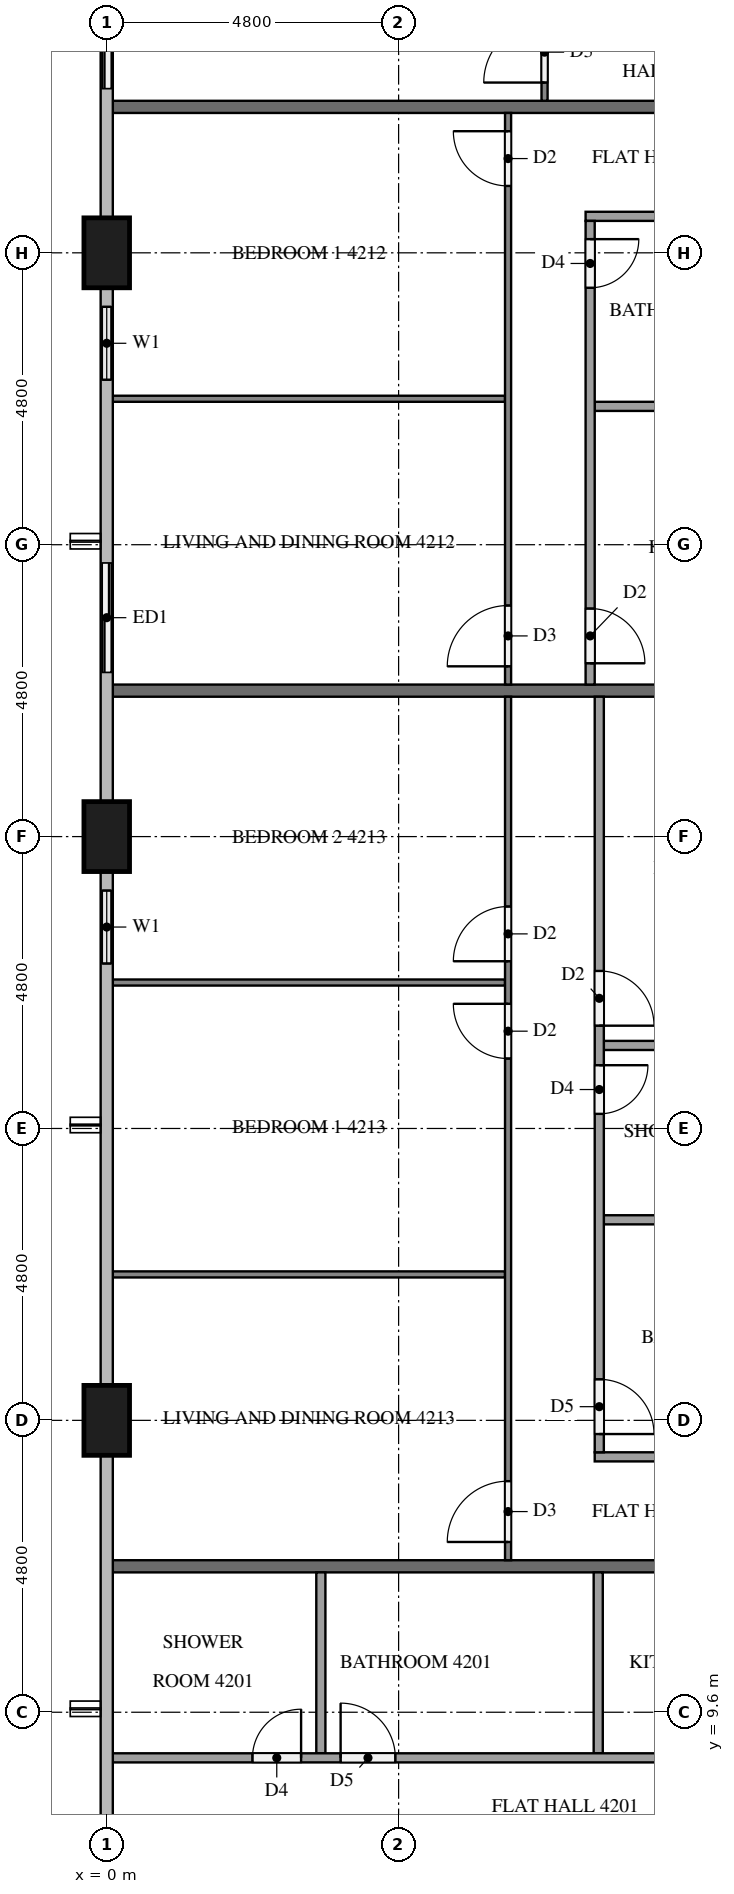
"""IFC4 building model, lengths in metres.
Left out: names, types, materials, properties, quantities, classifications, styles, units other than length and angle.
Written with IfcOpenShell. Run it as: python <this file> out.ifc"""

import sys

from ifc_helpers import new_model, si_unit, direction, frame, frame_2d, origin, origin_2d, place, context, subcontext, project, spatial, rectangle, extrude, element, fill, save


model = new_model("IFC4")
c1 = context("Model", 3, precision=1e-05, world=origin(), true_north=direction((0.0, 1.0)))
c2 = subcontext(c1, "Body", "Model", "MODEL_VIEW")
j1 = project(units=[si_unit("LENGTHUNIT", "METRE"), si_unit("PLANEANGLEUNIT", "RADIAN")], contexts=[c1])
p1 = place(None, origin())
s1 = spatial("IfcSite", under=j1, at=p1, CompositionType="ELEMENT")
p2 = place(p1, origin())
s2 = spatial("IfcBuilding", under=s1, at=p2, CompositionType="ELEMENT")
p3 = place(p2, frame((0.0, 0.0, 163.0)))
s3 = spatial("IfcBuildingStorey", under=s2, at=p3, CompositionType="ELEMENT", Elevation=163.0)
for number, where, z_axis, x_axis in (
    (1, (0.0, 33.6, 0.0), (0.0, 0.0, 1.0), (0.0, 1.0, 0.0)),
    (2, (0.0, 24.0, 0.0), (0.0, 0.0, 1.0), (0.0, 1.0, 0.0)),
    (3, (0.0, 14.4, 0.0), (0.0, 0.0, 1.0), (0.0, 1.0, 0.0)),
):
    element("IfcColumn", number, at=place(p3, frame(where, z_axis=z_axis, x_axis=x_axis)), inside=s3, PredefinedType="COLUMN", context=c2, shape_type="SweptSolid", body=[
        extrude(rectangle(XDim=1.15, YDim=0.75, at=origin_2d()), origin(), (0.0, 0.0, 1.0), 3.2),
    ])
p4 = place(p3, frame((0.0, 38.4, 0.0), z_axis=(0.0, 0.0, 1.0), x_axis=(0.0, -1.0, 0.0)))
e4 = element("IfcWall", 4, at=p4, inside=s3, PredefinedType="SOLIDWALL", context=c2, shape_type="SweptSolid", body=[
    extrude(rectangle(XDim=2.4, YDim=0.15, at=frame_2d((1.2, 0.0))), origin(), (0.0, 0.0, 1.0), 3.2),
])
p5 = place(p4, frame((0.3, 0.0, 0.0)))
e5 = element("IfcOpeningElement", 5, at=p5, cuts=e4, PredefinedType="OPENING", context=c2, shape_type="SweptSolid", body=[
    extrude(rectangle(XDim=1.8, YDim=2.4, at=frame_2d((0.9, 1.2))), frame((0.0, 0.085, 0.0), z_axis=(0.0, -1.0, 0.0), x_axis=(1.0, 0.0, 0.0)), (0.0, 0.0, 1.0), 0.17),
])
p6 = place(p3, frame((0.0, 33.025, 0.0), z_axis=(0.0, 0.0, 1.0), x_axis=(0.0, -1.0, 0.0)))
e6 = element("IfcWall", 6, at=p6, inside=s3, PredefinedType="SOLIDWALL", context=c2, shape_type="SweptSolid", body=[
    extrude(rectangle(XDim=1.825, YDim=0.15, at=frame_2d((0.913, 0.0))), origin(), (0.0, 0.0, 1.0), 3.2),
])
p7 = place(p6, frame((0.312, 0.0, 0.9)))
e7 = element("IfcOpeningElement", 7, at=p7, cuts=e6, PredefinedType="OPENING", context=c2, shape_type="SweptSolid", body=[
    extrude(rectangle(XDim=1.2, YDim=1.4, at=frame_2d((0.6, 0.7))), frame((0.0, 0.085, 0.0), z_axis=(0.0, -1.0, 0.0), x_axis=(1.0, 0.0, 0.0)), (0.0, 0.0, 1.0), 0.17),
])
p8 = place(p3, frame((0.0, 28.8, 0.0), z_axis=(0.0, 0.0, 1.0), x_axis=(0.0, -1.0, 0.0)))
e8 = element("IfcWall", 8, at=p8, inside=s3, PredefinedType="SOLIDWALL", context=c2, shape_type="SweptSolid", body=[
    extrude(rectangle(XDim=2.4, YDim=0.15, at=frame_2d((1.2, 0.0))), origin(), (0.0, 0.0, 1.0), 3.2),
])
p9 = place(p8, frame((0.3, 0.0, 0.0)))
e9 = element("IfcOpeningElement", 9, at=p9, cuts=e8, PredefinedType="OPENING", context=c2, shape_type="SweptSolid", body=[
    extrude(rectangle(XDim=1.8, YDim=2.4, at=frame_2d((0.9, 1.2))), frame((0.0, 0.085, 0.0), z_axis=(0.0, -1.0, 0.0), x_axis=(1.0, 0.0, 0.0)), (0.0, 0.0, 1.0), 0.17),
])
p10 = place(p3, frame((0.0, 23.425, 0.0), z_axis=(0.0, 0.0, 1.0), x_axis=(0.0, -1.0, 0.0)))
e10 = element("IfcWall", 10, at=p10, inside=s3, PredefinedType="SOLIDWALL", context=c2, shape_type="SweptSolid", body=[
    extrude(rectangle(XDim=1.825, YDim=0.15, at=frame_2d((0.913, 0.0))), origin(), (0.0, 0.0, 1.0), 3.2),
])
p11 = place(p10, frame((0.312, 0.0, 0.9)))
e11 = element("IfcOpeningElement", 11, at=p11, cuts=e10, PredefinedType="OPENING", context=c2, shape_type="SweptSolid", body=[
    extrude(rectangle(XDim=1.2, YDim=1.4, at=frame_2d((0.6, 0.7))), frame((0.0, 0.085, 0.0), z_axis=(0.0, -1.0, 0.0), x_axis=(1.0, 0.0, 0.0)), (0.0, 0.0, 1.0), 0.17),
])
for number, where, z_axis, x_axis in (
    (12, (0.1, 12.0, 0.0), (0.0, 0.0, 1.0), (1.0, 0.0, 0.0)),
    (13, (0.1, 36.0, 0.0), (0.0, 0.0, 1.0), (1.0, 0.0, 0.0)),
    (14, (0.1, 26.4, 0.0), (0.0, 0.0, 1.0), (1.0, 0.0, 0.0)),
):
    element("IfcWall", number, at=place(p3, frame(where, z_axis=z_axis, x_axis=x_axis)), inside=s3, PredefinedType="PARTITIONING", context=c2, shape_type="SweptSolid", body=[
        extrude(rectangle(XDim=11.8, YDim=0.2, at=frame_2d((5.9, 0.0))), origin(), (0.0, 0.0, 1.0), 3.2),
    ])
for number, where, z_axis, x_axis in (
    (15, (8.083, 11.9, 0.0), (0.0, 0.0, 1.0), (0.0, -1.0, 0.0)),
    (16, (3.521, 11.9, 0.0), (0.0, 0.0, 1.0), (0.0, -1.0, 0.0)),
):
    element("IfcWall", number, at=place(p3, frame(where, z_axis=z_axis, x_axis=x_axis)), inside=s3, PredefinedType="PARTITIONING", context=c2, shape_type="SweptSolid", body=[
        extrude(rectangle(XDim=2.975, YDim=0.15, at=frame_2d((1.487, 0.0))), origin(), (0.0, 0.0, 1.0), 3.2),
    ])
p12 = place(p3, frame((0.1, 8.85, 0.0), z_axis=(0.0, 0.0, 1.0), x_axis=(1.0, 0.0, 0.0)))
e17 = element("IfcWall", 17, at=p12, inside=s3, PredefinedType="PARTITIONING", context=c2, shape_type="SweptSolid", body=[
    extrude(rectangle(XDim=14.825, YDim=0.15, at=frame_2d((7.413, 0.0))), origin(), (0.0, 0.0, 1.0), 3.2),
])
p13 = place(p12, frame((13.625, 0.0, 0.0)))
e18 = element("IfcOpeningElement", 18, at=p13, cuts=e17, PredefinedType="OPENING", context=c2, shape_type="SweptSolid", body=[
    extrude(rectangle(XDim=0.9, YDim=2.1, at=frame_2d((0.45, 1.05))), frame((0.0, 0.085, 0.0), z_axis=(0.0, -1.0, 0.0), x_axis=(1.0, 0.0, 0.0)), (0.0, 0.0, 1.0), 0.17),
])
p14 = place(p12, frame((3.746, 0.0, 0.0)))
e19 = element("IfcOpeningElement", 19, at=p14, cuts=e17, PredefinedType="OPENING", context=c2, shape_type="SweptSolid", body=[
    extrude(rectangle(XDim=0.9, YDim=2.1, at=frame_2d((0.45, 1.05))), frame((0.0, 0.085, 0.0), z_axis=(0.0, -1.0, 0.0), x_axis=(1.0, 0.0, 0.0)), (0.0, 0.0, 1.0), 0.17),
])
p15 = place(p12, frame((2.296, 0.0, 0.0)))
e20 = element("IfcOpeningElement", 20, at=p15, cuts=e17, PredefinedType="OPENING", context=c2, shape_type="SweptSolid", body=[
    extrude(rectangle(XDim=0.8, YDim=2.1, at=frame_2d((0.4, 1.05))), frame((0.0, 0.085, 0.0), z_axis=(0.0, -1.0, 0.0), x_axis=(1.0, 0.0, 0.0)), (0.0, 0.0, 1.0), 0.17),
])
p16 = place(p3, frame((7.2, 36.1, 0.0), z_axis=(0.0, 0.0, 1.0), x_axis=(0.0, 1.0, 0.0)))
e21 = element("IfcWall", 21, at=p16, inside=s3, PredefinedType="PARTITIONING", context=c2, shape_type="SweptSolid", body=[
    extrude(rectangle(XDim=11.8, YDim=0.1, at=frame_2d((5.9, 0.0))), origin(), (0.0, 0.0, 1.0), 3.2),
])
p17 = place(p16, frame((0.3, 0.0, 0.0)))
e22 = element("IfcOpeningElement", 22, at=p17, cuts=e21, PredefinedType="OPENING", context=c2, shape_type="SweptSolid", body=[
    extrude(rectangle(XDim=1.0, YDim=2.1, at=frame_2d((0.5, 1.05))), frame((0.0, 0.06, 0.0), z_axis=(0.0, -1.0, 0.0), x_axis=(1.0, 0.0, 0.0)), (0.0, 0.0, 1.0), 0.12),
])
p18 = place(p16, frame((10.6, 0.0, 0.0)))
e23 = element("IfcOpeningElement", 23, at=p18, cuts=e21, PredefinedType="OPENING", context=c2, shape_type="SweptSolid", body=[
    extrude(rectangle(XDim=0.9, YDim=2.1, at=frame_2d((0.45, 1.05))), frame((0.0, 0.06, 0.0), z_axis=(0.0, -1.0, 0.0), x_axis=(1.0, 0.0, 0.0)), (0.0, 0.0, 1.0), 0.12),
])
p19 = place(p3, frame((6.55, 31.2, 0.0), z_axis=(0.0, 0.0, 1.0), x_axis=(-1.0, 0.0, 0.0)))
e24 = element("IfcWall", 24, at=p19, inside=s3, PredefinedType="PARTITIONING", context=c2, shape_type="SweptSolid", body=[
    extrude(rectangle(XDim=6.45, YDim=0.1, at=frame_2d((3.225, 0.0))), origin(), (0.0, 0.0, 1.0), 3.2),
])
p20 = place(p3, frame((6.6, 26.5, 0.0), z_axis=(0.0, 0.0, 1.0), x_axis=(0.0, 1.0, 0.0)))
e25 = element("IfcWall", 25, at=p20, inside=s3, PredefinedType="PARTITIONING", context=c2, shape_type="SweptSolid", body=[
    extrude(rectangle(XDim=9.4, YDim=0.1, at=frame_2d((4.7, 0.0))), origin(), (0.0, 0.0, 1.0), 3.2),
])
p21 = place(p20, frame((8.2, 0.0, 0.0)))
e26 = element("IfcOpeningElement", 26, at=p21, cuts=e25, PredefinedType="OPENING", context=c2, shape_type="SweptSolid", body=[
    extrude(rectangle(XDim=0.9, YDim=2.1, at=frame_2d((0.45, 1.05))), frame((0.0, 0.06, 0.0), z_axis=(0.0, -1.0, 0.0), x_axis=(1.0, 0.0, 0.0)), (0.0, 0.0, 1.0), 0.12),
])
p22 = place(p20, frame((0.3, 0.0, 0.0)))
e27 = element("IfcOpeningElement", 27, at=p22, cuts=e25, PredefinedType="OPENING", context=c2, shape_type="SweptSolid", body=[
    extrude(rectangle(XDim=1.0, YDim=2.1, at=frame_2d((0.5, 1.05))), frame((0.0, 0.06, 0.0), z_axis=(0.0, -1.0, 0.0), x_axis=(1.0, 0.0, 0.0)), (0.0, 0.0, 1.0), 0.12),
])
p23 = place(p3, frame((11.9, 31.075, 0.0), z_axis=(0.0, 0.0, 1.0), x_axis=(-1.0, 0.0, 0.0)))
e28 = element("IfcWall", 28, at=p23, inside=s3, PredefinedType="PARTITIONING", context=c2, shape_type="SweptSolid", body=[
    extrude(rectangle(XDim=3.875, YDim=0.15, at=frame_2d((1.938, 0.0))), origin(), (0.0, 0.0, 1.0), 3.2),
])
p24 = place(p3, frame((11.9, 34.2, 0.0), z_axis=(0.0, 0.0, 1.0), x_axis=(-1.0, 0.0, 0.0)))
e29 = element("IfcWall", 29, at=p24, inside=s3, PredefinedType="PARTITIONING", context=c2, shape_type="SweptSolid", body=[
    extrude(rectangle(XDim=4.025, YDim=0.15, at=frame_2d((2.012, 0.0))), origin(), (0.0, 0.0, 1.0), 3.2),
])
p25 = place(p3, frame((7.95, 34.125, 0.0), z_axis=(0.0, 0.0, 1.0), x_axis=(0.0, -1.0, 0.0)))
e30 = element("IfcWall", 30, at=p25, inside=s3, PredefinedType="PARTITIONING", context=c2, shape_type="SweptSolid", body=[
    extrude(rectangle(XDim=7.625, YDim=0.15, at=frame_2d((3.812, 0.0))), origin(), (0.0, 0.0, 1.0), 3.2),
])
p26 = place(p25, frame((0.3, 0.0, 0.0)))
e31 = element("IfcOpeningElement", 31, at=p26, cuts=e30, PredefinedType="OPENING", context=c2, shape_type="SweptSolid", body=[
    extrude(rectangle(XDim=0.8, YDim=2.1, at=frame_2d((0.4, 1.05))), frame((0.0, 0.085, 0.0), z_axis=(0.0, -1.0, 0.0), x_axis=(1.0, 0.0, 0.0)), (0.0, 0.0, 1.0), 0.17),
])
p27 = place(p25, frame((6.375, 0.0, 0.0)))
e32 = element("IfcOpeningElement", 32, at=p27, cuts=e30, PredefinedType="OPENING", context=c2, shape_type="SweptSolid", body=[
    extrude(rectangle(XDim=0.9, YDim=2.1, at=frame_2d((0.45, 1.05))), frame((0.0, 0.085, 0.0), z_axis=(0.0, -1.0, 0.0), x_axis=(1.0, 0.0, 0.0)), (0.0, 0.0, 1.0), 0.17),
])
for number, where, z_axis, x_axis in (
    (33, (6.55, 16.8, 0.0), (0.0, 0.0, 1.0), (-1.0, 0.0, 0.0)),
    (34, (6.55, 21.6, 0.0), (0.0, 0.0, 1.0), (-1.0, 0.0, 0.0)),
):
    element("IfcWall", number, at=place(p3, frame(where, z_axis=z_axis, x_axis=x_axis)), inside=s3, PredefinedType="PARTITIONING", context=c2, shape_type="SweptSolid", body=[
        extrude(rectangle(XDim=6.45, YDim=0.1, at=frame_2d((3.225, 0.0))), origin(), (0.0, 0.0, 1.0), 3.2),
    ])
p28 = place(p3, frame((6.6, 12.1, 0.0), z_axis=(0.0, 0.0, 1.0), x_axis=(0.0, 1.0, 0.0)))
e35 = element("IfcWall", 35, at=p28, inside=s3, PredefinedType="PARTITIONING", context=c2, shape_type="SweptSolid", body=[
    extrude(rectangle(XDim=14.2, YDim=0.1, at=frame_2d((7.1, 0.0))), origin(), (0.0, 0.0, 1.0), 3.2),
])
p29 = place(p28, frame((0.3, 0.0, 0.0)))
e36 = element("IfcOpeningElement", 36, at=p29, cuts=e35, PredefinedType="OPENING", context=c2, shape_type="SweptSolid", body=[
    extrude(rectangle(XDim=1.0, YDim=2.1, at=frame_2d((0.5, 1.05))), frame((0.0, 0.06, 0.0), z_axis=(0.0, -1.0, 0.0), x_axis=(1.0, 0.0, 0.0)), (0.0, 0.0, 1.0), 0.12),
])
p30 = place(p28, frame((8.25, 0.0, 0.0)))
e37 = element("IfcOpeningElement", 37, at=p30, cuts=e35, PredefinedType="OPENING", context=c2, shape_type="SweptSolid", body=[
    extrude(rectangle(XDim=0.9, YDim=2.1, at=frame_2d((0.45, 1.05))), frame((0.0, 0.06, 0.0), z_axis=(0.0, -1.0, 0.0), x_axis=(1.0, 0.0, 0.0)), (0.0, 0.0, 1.0), 0.12),
])
p31 = place(p28, frame((9.85, 0.0, 0.0)))
e38 = element("IfcOpeningElement", 38, at=p31, cuts=e35, PredefinedType="OPENING", context=c2, shape_type="SweptSolid", body=[
    extrude(rectangle(XDim=0.9, YDim=2.1, at=frame_2d((0.45, 1.05))), frame((0.0, 0.06, 0.0), z_axis=(0.0, -1.0, 0.0), x_axis=(1.0, 0.0, 0.0)), (0.0, 0.0, 1.0), 0.12),
])
for number, where, z_axis, x_axis in (
    (39, (11.9, 17.698, 0.0), (0.0, 0.0, 1.0), (-1.0, 0.0, 0.0)),
    (40, (11.9, 20.565, 0.0), (0.0, 0.0, 1.0), (-1.0, 0.0, 0.0)),
):
    element("IfcWall", number, at=place(p3, frame(where, z_axis=z_axis, x_axis=x_axis)), inside=s3, PredefinedType="PARTITIONING", context=c2, shape_type="SweptSolid", body=[
        extrude(rectangle(XDim=3.725, YDim=0.15, at=frame_2d((1.862, 0.0))), origin(), (0.0, 0.0, 1.0), 3.2),
    ])
p32 = place(p3, frame((11.9, 13.8, 0.0), z_axis=(0.0, 0.0, 1.0), x_axis=(-1.0, 0.0, 0.0)))
e41 = element("IfcWall", 41, at=p32, inside=s3, PredefinedType="PARTITIONING", context=c2, shape_type="SweptSolid", body=[
    extrude(rectangle(XDim=3.875, YDim=0.15, at=frame_2d((1.938, 0.0))), origin(), (0.0, 0.0, 1.0), 3.2),
])
p33 = place(p3, frame((8.1, 26.3, 0.0), z_axis=(0.0, 0.0, 1.0), x_axis=(0.0, -1.0, 0.0)))
e42 = element("IfcWall", 42, at=p33, inside=s3, PredefinedType="PARTITIONING", context=c2, shape_type="SweptSolid", body=[
    extrude(rectangle(XDim=12.425, YDim=0.15, at=frame_2d((6.212, 0.0))), origin(), (0.0, 0.0, 1.0), 3.2),
])
p34 = place(p33, frame((11.225, 0.0, 0.0)))
e43 = element("IfcOpeningElement", 43, at=p34, cuts=e42, PredefinedType="OPENING", context=c2, shape_type="SweptSolid", body=[
    extrude(rectangle(XDim=0.9, YDim=2.1, at=frame_2d((0.45, 1.05))), frame((0.0, 0.085, 0.0), z_axis=(0.0, -1.0, 0.0), x_axis=(1.0, 0.0, 0.0)), (0.0, 0.0, 1.0), 0.17),
])
p35 = place(p33, frame((6.06, 0.0, 0.0)))
e44 = element("IfcOpeningElement", 44, at=p35, cuts=e42, PredefinedType="OPENING", context=c2, shape_type="SweptSolid", body=[
    extrude(rectangle(XDim=0.8, YDim=2.1, at=frame_2d((0.4, 1.05))), frame((0.0, 0.085, 0.0), z_axis=(0.0, -1.0, 0.0), x_axis=(1.0, 0.0, 0.0)), (0.0, 0.0, 1.0), 0.17),
])
p36 = place(p33, frame((4.51, 0.0, 0.0)))
e45 = element("IfcOpeningElement", 45, at=p36, cuts=e42, PredefinedType="OPENING", context=c2, shape_type="SweptSolid", body=[
    extrude(rectangle(XDim=0.9, YDim=2.1, at=frame_2d((0.45, 1.05))), frame((0.0, 0.085, 0.0), z_axis=(0.0, -1.0, 0.0), x_axis=(1.0, 0.0, 0.0)), (0.0, 0.0, 1.0), 0.17),
])
p37 = place(p5, origin())
e46 = element("IfcDoor", 46, at=p37, inside=s3, OperationType="SLIDING_TO_LEFT", PredefinedType="DOOR", context=c2, shape_type="SweptSolid", body=[
    extrude(rectangle(XDim=1.8, YDim=2.4, at=frame_2d((0.9, 1.2))), frame((0.0, 0.025, 0.0), z_axis=(0.0, -1.0, 0.0), x_axis=(1.0, 0.0, 0.0)), (0.0, 0.0, 1.0), 0.05),
])
fill(e5, e46)
p38 = place(p7, origin())
e47 = element("IfcWindow", 47, at=p38, inside=s3, PartitioningType="SINGLE_PANEL", PredefinedType="WINDOW", context=c2, shape_type="SweptSolid", body=[
    extrude(rectangle(XDim=1.2, YDim=1.4, at=frame_2d((0.6, 0.7))), frame((0.0, 0.03, 0.0), z_axis=(0.0, -1.0, 0.0), x_axis=(1.0, 0.0, 0.0)), (0.0, 0.0, 1.0), 0.06),
])
fill(e7, e47)
p39 = place(p9, origin())
e48 = element("IfcDoor", 48, at=p39, inside=s3, OperationType="SLIDING_TO_RIGHT", PredefinedType="DOOR", context=c2, shape_type="SweptSolid", body=[
    extrude(rectangle(XDim=1.8, YDim=2.4, at=frame_2d((0.9, 1.2))), frame((0.0, 0.025, 0.0), z_axis=(0.0, -1.0, 0.0), x_axis=(1.0, 0.0, 0.0)), (0.0, 0.0, 1.0), 0.05),
])
fill(e9, e48)
p40 = place(p11, origin())
e49 = element("IfcWindow", 49, at=p40, inside=s3, PartitioningType="SINGLE_PANEL", PredefinedType="WINDOW", context=c2, shape_type="SweptSolid", body=[
    extrude(rectangle(XDim=1.2, YDim=1.4, at=frame_2d((0.6, 0.7))), frame((0.0, 0.03, 0.0), z_axis=(0.0, -1.0, 0.0), x_axis=(1.0, 0.0, 0.0)), (0.0, 0.0, 1.0), 0.06),
])
fill(e11, e49)
p41 = place(p14, origin())
e50 = element("IfcDoor", 50, at=p41, inside=s3, OperationType="SINGLE_SWING_LEFT", PredefinedType="DOOR", context=c2, shape_type="SweptSolid", body=[
    extrude(rectangle(XDim=0.9, YDim=2.1, at=frame_2d((0.45, 1.05))), frame((0.0, 0.025, 0.0), z_axis=(0.0, -1.0, 0.0), x_axis=(1.0, 0.0, 0.0)), (0.0, 0.0, 1.0), 0.05),
])
fill(e19, e50)
p42 = place(p15, origin())
e51 = element("IfcDoor", 51, at=p42, inside=s3, OperationType="SINGLE_SWING_RIGHT", PredefinedType="DOOR", context=c2, shape_type="SweptSolid", body=[
    extrude(rectangle(XDim=0.8, YDim=2.1, at=frame_2d((0.4, 1.05))), frame((0.0, 0.025, 0.0), z_axis=(0.0, -1.0, 0.0), x_axis=(1.0, 0.0, 0.0)), (0.0, 0.0, 1.0), 0.05),
])
fill(e20, e51)
p43 = place(p17, origin())
e52 = element("IfcDoor", 52, at=p43, inside=s3, OperationType="SINGLE_SWING_LEFT", PredefinedType="DOOR", context=c2, shape_type="SweptSolid", body=[
    extrude(rectangle(XDim=1.0, YDim=2.1, at=frame_2d((0.5, 1.05))), frame((0.0, 0.025, 0.0), z_axis=(0.0, -1.0, 0.0), x_axis=(1.0, 0.0, 0.0)), (0.0, 0.0, 1.0), 0.05),
])
fill(e22, e52)
p44 = place(p21, origin())
e53 = element("IfcDoor", 53, at=p44, inside=s3, OperationType="SINGLE_SWING_RIGHT", PredefinedType="DOOR", context=c2, shape_type="SweptSolid", body=[
    extrude(rectangle(XDim=0.9, YDim=2.1, at=frame_2d((0.45, 1.05))), frame((0.0, 0.025, 0.0), z_axis=(0.0, -1.0, 0.0), x_axis=(1.0, 0.0, 0.0)), (0.0, 0.0, 1.0), 0.05),
])
fill(e26, e53)
p45 = place(p22, origin())
e54 = element("IfcDoor", 54, at=p45, inside=s3, OperationType="SINGLE_SWING_LEFT", PredefinedType="DOOR", context=c2, shape_type="SweptSolid", body=[
    extrude(rectangle(XDim=1.0, YDim=2.1, at=frame_2d((0.5, 1.05))), frame((0.0, 0.025, 0.0), z_axis=(0.0, -1.0, 0.0), x_axis=(1.0, 0.0, 0.0)), (0.0, 0.0, 1.0), 0.05),
])
fill(e27, e54)
p46 = place(p26, origin())
e55 = element("IfcDoor", 55, at=p46, inside=s3, OperationType="SINGLE_SWING_LEFT", PredefinedType="DOOR", context=c2, shape_type="SweptSolid", body=[
    extrude(rectangle(XDim=0.8, YDim=2.1, at=frame_2d((0.4, 1.05))), frame((0.0, 0.025, 0.0), z_axis=(0.0, -1.0, 0.0), x_axis=(1.0, 0.0, 0.0)), (0.0, 0.0, 1.0), 0.05),
])
fill(e31, e55)
p47 = place(p27, origin())
e56 = element("IfcDoor", 56, at=p47, inside=s3, OperationType="SINGLE_SWING_RIGHT", PredefinedType="DOOR", context=c2, shape_type="SweptSolid", body=[
    extrude(rectangle(XDim=0.9, YDim=2.1, at=frame_2d((0.45, 1.05))), frame((0.0, 0.025, 0.0), z_axis=(0.0, -1.0, 0.0), x_axis=(1.0, 0.0, 0.0)), (0.0, 0.0, 1.0), 0.05),
])
fill(e32, e56)
p48 = place(p29, origin())
e57 = element("IfcDoor", 57, at=p48, inside=s3, OperationType="SINGLE_SWING_LEFT", PredefinedType="DOOR", context=c2, shape_type="SweptSolid", body=[
    extrude(rectangle(XDim=1.0, YDim=2.1, at=frame_2d((0.5, 1.05))), frame((0.0, 0.025, 0.0), z_axis=(0.0, -1.0, 0.0), x_axis=(1.0, 0.0, 0.0)), (0.0, 0.0, 1.0), 0.05),
])
fill(e36, e57)
p49 = place(p30, origin())
e58 = element("IfcDoor", 58, at=p49, inside=s3, OperationType="SINGLE_SWING_RIGHT", PredefinedType="DOOR", context=c2, shape_type="SweptSolid", body=[
    extrude(rectangle(XDim=0.9, YDim=2.1, at=frame_2d((0.45, 1.05))), frame((0.0, 0.025, 0.0), z_axis=(0.0, -1.0, 0.0), x_axis=(1.0, 0.0, 0.0)), (0.0, 0.0, 1.0), 0.05),
])
fill(e37, e58)
p50 = place(p31, origin())
e59 = element("IfcDoor", 59, at=p50, inside=s3, OperationType="SINGLE_SWING_LEFT", PredefinedType="DOOR", context=c2, shape_type="SweptSolid", body=[
    extrude(rectangle(XDim=0.9, YDim=2.1, at=frame_2d((0.45, 1.05))), frame((0.0, 0.025, 0.0), z_axis=(0.0, -1.0, 0.0), x_axis=(1.0, 0.0, 0.0)), (0.0, 0.0, 1.0), 0.05),
])
fill(e38, e59)
p51 = place(p34, origin())
e60 = element("IfcDoor", 60, at=p51, inside=s3, OperationType="SINGLE_SWING_RIGHT", PredefinedType="DOOR", context=c2, shape_type="SweptSolid", body=[
    extrude(rectangle(XDim=0.9, YDim=2.1, at=frame_2d((0.45, 1.05))), frame((0.0, 0.025, 0.0), z_axis=(0.0, -1.0, 0.0), x_axis=(1.0, 0.0, 0.0)), (0.0, 0.0, 1.0), 0.05),
])
fill(e43, e60)
p52 = place(p35, origin())
e61 = element("IfcDoor", 61, at=p52, inside=s3, OperationType="SINGLE_SWING_LEFT", PredefinedType="DOOR", context=c2, shape_type="SweptSolid", body=[
    extrude(rectangle(XDim=0.8, YDim=2.1, at=frame_2d((0.4, 1.05))), frame((0.0, 0.025, 0.0), z_axis=(0.0, -1.0, 0.0), x_axis=(1.0, 0.0, 0.0)), (0.0, 0.0, 1.0), 0.05),
])
fill(e44, e61)
p53 = place(p36, origin())
e62 = element("IfcDoor", 62, at=p53, inside=s3, OperationType="SINGLE_SWING_RIGHT", PredefinedType="DOOR", context=c2, shape_type="SweptSolid", body=[
    extrude(rectangle(XDim=0.9, YDim=2.1, at=frame_2d((0.45, 1.05))), frame((0.0, 0.025, 0.0), z_axis=(0.0, -1.0, 0.0), x_axis=(1.0, 0.0, 0.0)), (0.0, 0.0, 1.0), 0.05),
])
fill(e45, e62)
save(model, sys.argv[1])
